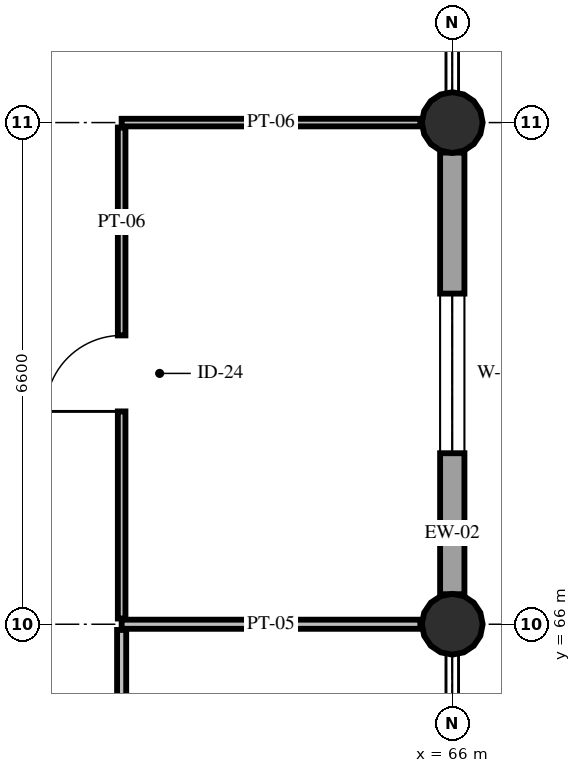
"""IFC4 building model, lengths in metres.
Left out: names, types, materials, properties, quantities, classifications, styles, units other than length and angle.
Written with IfcOpenShell. Run it as: python <this file> out.ifc"""

import sys

from ifc_helpers import new_model, si_unit, direction, frame, frame_2d, origin, origin_2d, place, context, subcontext, project, spatial, rectangle, circle, extrude, element, fill, save


model = new_model("IFC4")
c1 = context("Model", 3, precision=1e-05, world=origin(), true_north=direction((0.0, 1.0)))
c2 = subcontext(c1, "Body", "Model", "MODEL_VIEW")
j1 = project(units=[si_unit("LENGTHUNIT", "METRE"), si_unit("PLANEANGLEUNIT", "RADIAN")], contexts=[c1])
p1 = place(None, origin())
s1 = spatial("IfcSite", under=j1, at=p1, CompositionType="ELEMENT")
p2 = place(p1, origin())
s2 = spatial("IfcBuilding", under=s1, at=p2, CompositionType="ELEMENT")
p3 = place(p2, frame((0.0, 0.0, 15.0)))
s3 = spatial("IfcBuildingStorey", under=s2, at=p3, CompositionType="ELEMENT", Elevation=15.0)
for number, where, z_axis, x_axis in (
    (1, (66.0, 66.0, 0.0), (0.0, 0.0, 1.0), (1.0, 0.0, 0.0)),
    (2, (66.0, 72.6, 0.0), (0.0, 0.0, 1.0), (1.0, 0.0, 0.0)),
):
    element("IfcColumn", number, at=place(p3, frame(where, z_axis=z_axis, x_axis=x_axis)), inside=s3, PredefinedType="COLUMN", context=c2, shape_type="SweptSolid", body=[
        extrude(circle(Radius=0.4, at=origin_2d()), origin(), (0.0, 0.0, 1.0), 4.8),
    ])
p4 = place(p3, frame((66.0, 72.205, 0.0), z_axis=(0.0, 0.0, 1.0), x_axis=(0.0, -1.0, 0.0)))
e3 = element("IfcWall", 3, at=p4, inside=s3, PredefinedType="STANDARD", context=c2, shape_type="SweptSolid", body=[
    extrude(rectangle(XDim=5.81, YDim=0.32, at=frame_2d((2.905, 0.0))), origin(), (0.0, 0.0, 1.0), 3.36),
])
p5 = place(p4, frame((1.855, 0.0, 0.85)))
e4 = element("IfcOpeningElement", 4, at=p5, cuts=e3, PredefinedType="OPENING", context=c2, shape_type="SweptSolid", body=[
    extrude(rectangle(XDim=2.1, YDim=1.7, at=frame_2d((1.05, 0.85))), frame((0.0, 0.175, 0.0), z_axis=(0.0, -1.0, 0.0), x_axis=(1.0, 0.0, 0.0)), (0.0, 0.0, 1.0), 0.35),
])
p6 = place(p3, frame((61.65, 66.0, 0.0), z_axis=(0.0, 0.0, 1.0), x_axis=(1.0, 0.0, 0.0)))
e5 = element("IfcWall", 5, at=p6, inside=s3, PredefinedType="PARTITIONING", context=c2, shape_type="SweptSolid", body=[
    extrude(rectangle(XDim=3.93, YDim=0.12, at=frame_2d((1.965, 0.0))), origin(), (0.0, 0.0, 1.0), 3.36),
])
p7 = place(p3, frame((61.65, 51.075, 0.0), z_axis=(0.0, 0.0, 1.0), x_axis=(0.0, 1.0, 0.0)))
e6 = element("IfcWall", 6, at=p7, inside=s3, PredefinedType="PARTITIONING", context=c2, shape_type="SweptSolid", body=[
    extrude(rectangle(XDim=14.85, YDim=0.12, at=frame_2d((7.425, 0.0))), origin(), (0.0, 0.0, 1.0), 3.36),
])
p8 = place(p7, frame((5.465, 0.0, 0.0)))
e7 = element("IfcOpeningElement", 7, at=p8, cuts=e6, PredefinedType="OPENING", context=c2, shape_type="SweptSolid", body=[
    extrude(rectangle(XDim=1.92, YDim=2.4, at=frame_2d((0.96, 1.2))), frame((0.0, 0.075, 0.0), z_axis=(0.0, -1.0, 0.0), x_axis=(1.0, 0.0, 0.0)), (0.0, 0.0, 1.0), 0.15),
])
p9 = place(p3, frame((61.65, 72.6, 0.0), z_axis=(0.0, 0.0, 1.0), x_axis=(1.0, 0.0, 0.0)))
e8 = element("IfcWall", 8, at=p9, inside=s3, PredefinedType="PARTITIONING", context=c2, shape_type="SweptSolid", body=[
    extrude(rectangle(XDim=3.93, YDim=0.1, at=frame_2d((1.965, 0.0))), origin(), (0.0, 0.0, 1.0), 3.36),
])
p10 = place(p3, frame((61.65, 66.075, 0.0), z_axis=(0.0, 0.0, 1.0), x_axis=(0.0, 1.0, 0.0)))
e9 = element("IfcWall", 9, at=p10, inside=s3, PredefinedType="PARTITIONING", context=c2, shape_type="SweptSolid", body=[
    extrude(rectangle(XDim=6.46, YDim=0.1, at=frame_2d((3.23, 0.0))), origin(), (0.0, 0.0, 1.0), 3.36),
])
p11 = place(p10, frame((2.725, 0.0, 0.0)))
e10 = element("IfcOpeningElement", 10, at=p11, cuts=e9, PredefinedType="OPENING", context=c2, shape_type="SweptSolid", body=[
    extrude(rectangle(XDim=1.0, YDim=2.15, at=frame_2d((0.5, 1.075))), frame((0.0, 0.065, 0.0), z_axis=(0.0, -1.0, 0.0), x_axis=(1.0, 0.0, 0.0)), (0.0, 0.0, 1.0), 0.13),
])
p12 = place(p5, origin())
e11 = element("IfcWindow", 11, at=p12, inside=s3, PartitioningType="DOUBLE_PANEL_VERTICAL", PredefinedType="WINDOW", context=c2, shape_type="SweptSolid", body=[
    extrude(rectangle(XDim=2.1, YDim=1.7, at=frame_2d((1.05, 0.85))), frame((0.0, 0.03, 0.0), z_axis=(0.0, -1.0, 0.0), x_axis=(1.0, 0.0, 0.0)), (0.0, 0.0, 1.0), 0.06),
])
fill(e4, e11)
p13 = place(p11, origin())
e12 = element("IfcDoor", 12, at=p13, inside=s3, OperationType="SINGLE_SWING_LEFT", PredefinedType="DOOR", context=c2, shape_type="SweptSolid", body=[
    extrude(rectangle(XDim=1.0, YDim=2.15, at=frame_2d((0.5, 1.075))), frame((0.0, 0.025, 0.0), z_axis=(0.0, -1.0, 0.0), x_axis=(1.0, 0.0, 0.0)), (0.0, 0.0, 1.0), 0.05),
])
fill(e10, e12)
save(model, sys.argv[1])
